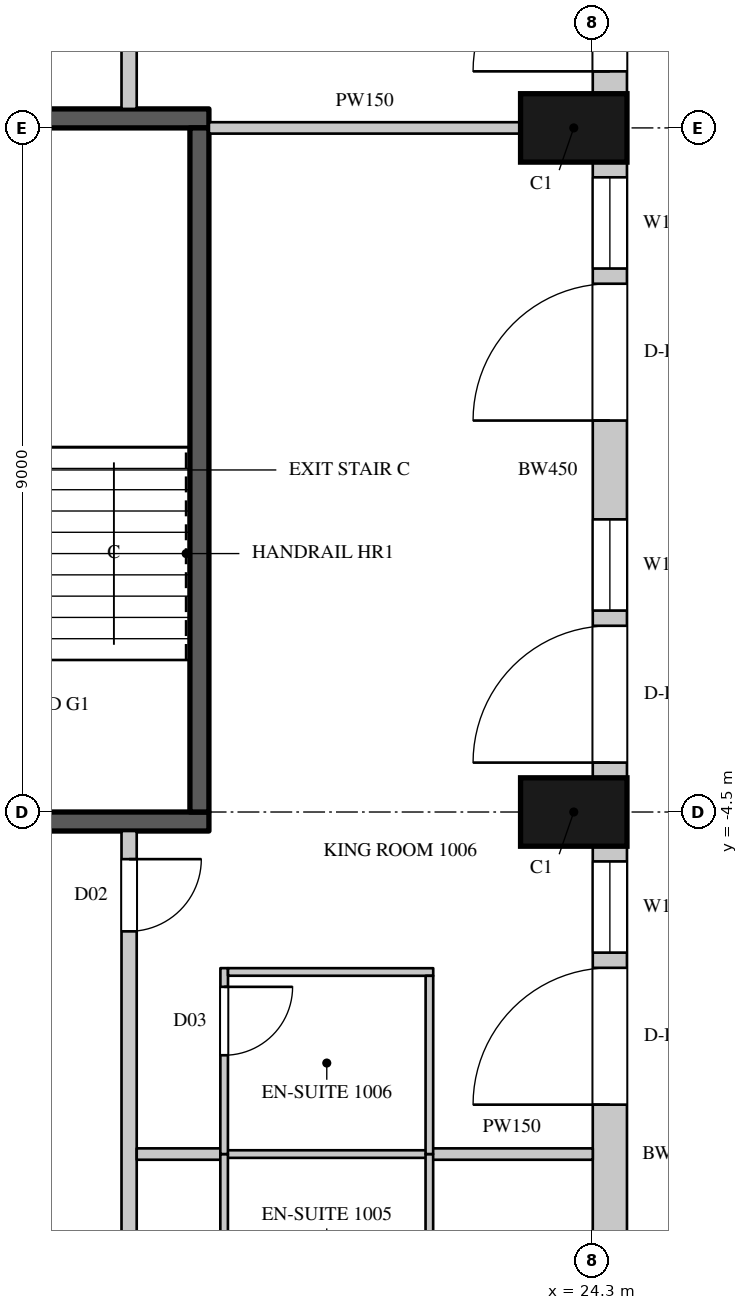
"""IFC4 building model, lengths in metres.
Left out: names, types, materials, properties, quantities, classifications, styles, units other than length and angle.
Written with IfcOpenShell. Run it as: python <this file> out.ifc"""

import sys

from ifc_helpers import new_model, si_unit, direction, frame, frame_2d, origin, origin_2d, place, context, subcontext, project, spatial, rectangle, extrude, element, fill, save


model = new_model("IFC4")
c1 = context("Model", 3, precision=1e-05, world=origin(), true_north=direction((0.0, 1.0)))
c2 = subcontext(c1, "Body", "Model", "MODEL_VIEW")
j1 = project(units=[si_unit("LENGTHUNIT", "METRE"), si_unit("PLANEANGLEUNIT", "RADIAN")], contexts=[c1])
p1 = place(None, origin())
s1 = spatial("IfcSite", under=j1, at=p1, CompositionType="ELEMENT")
p2 = place(p1, origin())
s2 = spatial("IfcBuilding", under=s1, at=p2, CompositionType="ELEMENT")
p3 = place(p2, frame((0.0, 0.0, 66.3)))
s3 = spatial("IfcBuildingStorey", under=s2, at=p3, CompositionType="ELEMENT", Elevation=66.3)
for number, where, z_axis, x_axis in (
    (1, (24.05, -4.5, 0.0), (0.0, 0.0, 1.0), (0.0, 1.0, 0.0)),
    (2, (24.05, 4.5, 0.0), (0.0, 0.0, 1.0), (0.0, 1.0, 0.0)),
):
    element("IfcColumn", number, at=place(p3, frame(where, z_axis=z_axis, x_axis=x_axis)), inside=s3, PredefinedType="COLUMN", context=c2, shape_type="SweptSolid", body=[
        extrude(rectangle(XDim=0.9, YDim=1.4, at=origin_2d()), origin(), (0.0, 0.0, 1.0), 3.6),
    ])
p4 = place(p3, frame((24.525, -13.05, 0.0), z_axis=(0.0, 0.0, 1.0), x_axis=(0.0, 1.0, 0.0)))
e3 = element("IfcWall", 3, at=p4, inside=s3, PredefinedType="SOLIDWALL", context=c2, shape_type="SweptSolid", body=[
    extrude(rectangle(XDim=8.1, YDim=0.45, at=frame_2d((4.05, 0.0))), origin(), (0.0, 0.0, 1.0), 3.3),
])
p5 = place(p4, frame((0.9, 0.0, 0.0)))
e4 = element("IfcOpeningElement", 4, at=p5, cuts=e3, PredefinedType="OPENING", context=c2, shape_type="SweptSolid", body=[
    extrude(rectangle(XDim=1.8, YDim=2.4, at=frame_2d((0.9, 1.2))), frame((0.0, 0.235, 0.0), z_axis=(0.0, -1.0, 0.0), x_axis=(1.0, 0.0, 0.0)), (0.0, 0.0, 1.0), 0.47),
])
p6 = place(p4, frame((4.7, 0.0, 0.0)))
e5 = element("IfcOpeningElement", 5, at=p6, cuts=e3, PredefinedType="OPENING", context=c2, shape_type="SweptSolid", body=[
    extrude(rectangle(XDim=1.8, YDim=2.4, at=frame_2d((0.9, 1.2))), frame((0.0, 0.235, 0.0), z_axis=(0.0, -1.0, 0.0), x_axis=(1.0, 0.0, 0.0)), (0.0, 0.0, 1.0), 0.47),
])
p7 = place(p4, frame((6.7, 0.0, 1.05)))
e6 = element("IfcOpeningElement", 6, at=p7, cuts=e3, PredefinedType="OPENING", context=c2, shape_type="SweptSolid", body=[
    extrude(rectangle(XDim=1.2, YDim=2.0, at=frame_2d((0.6, 1.0))), frame((0.0, 0.235, 0.0), z_axis=(0.0, -1.0, 0.0), x_axis=(1.0, 0.0, 0.0)), (0.0, 0.0, 1.0), 0.47),
])
p8 = place(p3, frame((24.525, -4.05, 0.0), z_axis=(0.0, 0.0, 1.0), x_axis=(0.0, 1.0, 0.0)))
e7 = element("IfcWall", 7, at=p8, inside=s3, PredefinedType="SOLIDWALL", context=c2, shape_type="SweptSolid", body=[
    extrude(rectangle(XDim=8.1, YDim=0.45, at=frame_2d((4.05, 0.0))), origin(), (0.0, 0.0, 1.0), 3.3),
])
p9 = place(p8, frame((0.2, 0.0, 0.0)))
e8 = element("IfcOpeningElement", 8, at=p9, cuts=e7, PredefinedType="OPENING", context=c2, shape_type="SweptSolid", body=[
    extrude(rectangle(XDim=1.8, YDim=2.4, at=frame_2d((0.9, 1.2))), frame((0.0, 0.235, 0.0), z_axis=(0.0, -1.0, 0.0), x_axis=(1.0, 0.0, 0.0)), (0.0, 0.0, 1.0), 0.47),
])
p10 = place(p8, frame((2.2, 0.0, 1.05)))
e9 = element("IfcOpeningElement", 9, at=p10, cuts=e7, PredefinedType="OPENING", context=c2, shape_type="SweptSolid", body=[
    extrude(rectangle(XDim=1.2, YDim=2.0, at=frame_2d((0.6, 1.0))), frame((0.0, 0.235, 0.0), z_axis=(0.0, -1.0, 0.0), x_axis=(1.0, 0.0, 0.0)), (0.0, 0.0, 1.0), 0.47),
])
p11 = place(p8, frame((4.7, 0.0, 0.0)))
e10 = element("IfcOpeningElement", 10, at=p11, cuts=e7, PredefinedType="OPENING", context=c2, shape_type="SweptSolid", body=[
    extrude(rectangle(XDim=1.8, YDim=2.4, at=frame_2d((0.9, 1.2))), frame((0.0, 0.235, 0.0), z_axis=(0.0, -1.0, 0.0), x_axis=(1.0, 0.0, 0.0)), (0.0, 0.0, 1.0), 0.47),
])
p12 = place(p8, frame((6.7, 0.0, 1.05)))
e11 = element("IfcOpeningElement", 11, at=p12, cuts=e7, PredefinedType="OPENING", context=c2, shape_type="SweptSolid", body=[
    extrude(rectangle(XDim=1.2, YDim=2.0, at=frame_2d((0.6, 1.0))), frame((0.0, 0.235, 0.0), z_axis=(0.0, -1.0, 0.0), x_axis=(1.0, 0.0, 0.0)), (0.0, 0.0, 1.0), 0.47),
])
p13 = place(p3, frame((24.525, 4.95, 0.0), z_axis=(0.0, 0.0, 1.0), x_axis=(0.0, 1.0, 0.0)))
e12 = element("IfcWall", 12, at=p13, inside=s3, PredefinedType="SOLIDWALL", context=c2, shape_type="SweptSolid", body=[
    extrude(rectangle(XDim=8.439, YDim=0.45, at=frame_2d((4.219, 0.0))), origin(), (0.0, 0.0, 1.0), 3.3),
])
p14 = place(p13, frame((0.294, 0.0, 0.0)))
e13 = element("IfcOpeningElement", 13, at=p14, cuts=e12, PredefinedType="OPENING", context=c2, shape_type="SweptSolid", body=[
    extrude(rectangle(XDim=1.8, YDim=2.4, at=frame_2d((0.9, 1.2))), frame((0.0, 0.235, 0.0), z_axis=(0.0, -1.0, 0.0), x_axis=(1.0, 0.0, 0.0)), (0.0, 0.0, 1.0), 0.47),
])
p15 = place(p13, frame((2.294, 0.0, 1.05)))
e14 = element("IfcOpeningElement", 14, at=p15, cuts=e12, PredefinedType="OPENING", context=c2, shape_type="SweptSolid", body=[
    extrude(rectangle(XDim=1.2, YDim=2.0, at=frame_2d((0.6, 1.0))), frame((0.0, 0.235, 0.0), z_axis=(0.0, -1.0, 0.0), x_axis=(1.0, 0.0, 0.0)), (0.0, 0.0, 1.0), 0.47),
])
p16 = place(p13, frame((5.232, 0.0, 1.05)))
e15 = element("IfcOpeningElement", 15, at=p16, cuts=e12, PredefinedType="OPENING", context=c2, shape_type="SweptSolid", body=[
    extrude(rectangle(XDim=2.7, YDim=2.0, at=frame_2d((1.35, 1.0))), frame((0.0, 0.235, 0.0), z_axis=(0.0, -1.0, 0.0), x_axis=(1.0, 0.0, 0.0)), (0.0, 0.0, 1.0), 0.47),
])
p17 = place(p3, frame((18.2, -19.42, 0.0), z_axis=(0.0, 0.0, 1.0), x_axis=(0.0, 1.0, 0.0)))
e16 = element("IfcWall", 16, at=p17, inside=s3, PredefinedType="PARTITIONING", context=c2, shape_type="SweptSolid", body=[
    extrude(rectangle(XDim=14.67, YDim=0.2, at=frame_2d((7.335, 0.0))), origin(), (0.0, 0.0, 1.0), 3.3),
])
p18 = place(p17, frame((3.95, 0.0, 0.0)))
e17 = element("IfcOpeningElement", 17, at=p18, cuts=e16, PredefinedType="OPENING", context=c2, shape_type="SweptSolid", body=[
    extrude(rectangle(XDim=0.95, YDim=2.2, at=frame_2d((0.475, 1.1))), frame((0.0, 0.11, 0.0), z_axis=(0.0, -1.0, 0.0), x_axis=(1.0, 0.0, 0.0)), (0.0, 0.0, 1.0), 0.22),
])
p19 = place(p17, frame((13.35, 0.0, 0.0)))
e18 = element("IfcOpeningElement", 18, at=p19, cuts=e16, PredefinedType="OPENING", context=c2, shape_type="SweptSolid", body=[
    extrude(rectangle(XDim=0.95, YDim=2.2, at=frame_2d((0.475, 1.1))), frame((0.0, 0.11, 0.0), z_axis=(0.0, -1.0, 0.0), x_axis=(1.0, 0.0, 0.0)), (0.0, 0.0, 1.0), 0.22),
])
p20 = place(p3, frame((18.2, 4.75, 0.0), z_axis=(0.0, 0.0, 1.0), x_axis=(0.0, 1.0, 0.0)))
e19 = element("IfcWall", 19, at=p20, inside=s3, PredefinedType="PARTITIONING", context=c2, shape_type="SweptSolid", body=[
    extrude(rectangle(XDim=14.134, YDim=0.2, at=frame_2d((7.067, 0.0))), origin(), (0.0, 0.0, 1.0), 3.3),
])
p21 = place(p20, frame((1.7, 0.0, 0.0)))
e20 = element("IfcOpeningElement", 20, at=p21, cuts=e19, PredefinedType="OPENING", context=c2, shape_type="SweptSolid", body=[
    extrude(rectangle(XDim=0.9, YDim=2.2, at=frame_2d((0.45, 1.1))), frame((0.0, 0.11, 0.0), z_axis=(0.0, -1.0, 0.0), x_axis=(1.0, 0.0, 0.0)), (0.0, 0.0, 1.0), 0.22),
])
p22 = place(p3, frame((18.3, -9.0, 0.0), z_axis=(0.0, 0.0, 1.0), x_axis=(1.0, 0.0, 0.0)))
e21 = element("IfcWall", 21, at=p22, inside=s3, PredefinedType="PARTITIONING", context=c2, shape_type="SweptSolid", body=[
    extrude(rectangle(XDim=1.13, YDim=0.15, at=frame_2d((0.565, 0.0))), origin(), (0.0, 0.0, 1.0), 2.65),
])
p23 = place(p3, frame((19.25, 4.5, 0.0), z_axis=(0.0, 0.0, 1.0), x_axis=(1.0, 0.0, 0.0)))
e22 = element("IfcWall", 22, at=p23, inside=s3, PredefinedType="PARTITIONING", context=c2, shape_type="SweptSolid", body=[
    extrude(rectangle(XDim=4.1, YDim=0.15, at=frame_2d((2.05, 0.0))), origin(), (0.0, 0.0, 1.0), 3.3),
])
p24 = place(p3, frame((22.17, -9.0, 0.0), z_axis=(0.0, 0.0, 1.0), x_axis=(1.0, 0.0, 0.0)))
e23 = element("IfcWall", 23, at=p24, inside=s3, PredefinedType="PARTITIONING", context=c2, shape_type="SweptSolid", body=[
    extrude(rectangle(XDim=2.13, YDim=0.15, at=frame_2d((1.065, 0.0))), origin(), (0.0, 0.0, 1.0), 2.65),
])
for number, where, z_axis, x_axis in (
    (24, (14.55, -4.625, 0.0), (0.0, 0.0, 1.0), (1.0, 0.0, 0.0)),
    (25, (14.55, 4.625, 0.0), (0.0, 0.0, 1.0), (1.0, 0.0, 0.0)),
):
    element("IfcWall", number, at=place(p3, frame(where, z_axis=z_axis, x_axis=x_axis)), inside=s3, PredefinedType="SHEAR", context=c2, shape_type="SweptSolid", body=[
        extrude(rectangle(XDim=4.7, YDim=0.25, at=frame_2d((2.35, 0.0))), origin(), (0.0, 0.0, 1.0), 3.3),
    ])
p25 = place(p3, frame((19.125, -4.5, 0.0), z_axis=(0.0, 0.0, 1.0), x_axis=(0.0, 1.0, 0.0)))
e26 = element("IfcWall", 26, at=p25, inside=s3, PredefinedType="SHEAR", context=c2, shape_type="SweptSolid", body=[
    extrude(rectangle(XDim=9.0, YDim=0.25, at=frame_2d((4.5, 0.0))), origin(), (0.0, 0.0, 1.0), 3.3),
])
p26 = place(p3, frame((19.43, -9.0, 0.0), z_axis=(0.0, 0.0, 1.0), x_axis=(1.0, 0.0, 0.0)))
e27 = element("IfcWall", 27, at=p26, inside=s3, PredefinedType="PARTITIONING", context=c2, shape_type="SweptSolid", body=[
    extrude(rectangle(XDim=2.74, YDim=0.1, at=frame_2d((1.37, 0.0))), origin(), (0.0, 0.0, 1.0), 2.65),
])
p27 = place(p3, frame((19.45, -11.346, 0.0), z_axis=(0.0, 0.0, 1.0), x_axis=(0.0, 1.0, 0.0)))
e28 = element("IfcWall", 28, at=p27, inside=s3, PredefinedType="PARTITIONING", context=c2, shape_type="SweptSolid", body=[
    extrude(rectangle(XDim=2.346, YDim=0.1, at=frame_2d((1.173, 0.0))), origin(), (0.0, 0.0, 1.0), 3.3),
])
p28 = place(p27, frame((0.15, 0.0, 0.0)))
e29 = element("IfcOpeningElement", 29, at=p28, cuts=e28, PredefinedType="OPENING", context=c2, shape_type="SweptSolid", body=[
    extrude(rectangle(XDim=0.9, YDim=2.2, at=frame_2d((0.45, 1.1))), frame((0.0, 0.06, 0.0), z_axis=(0.0, -1.0, 0.0), x_axis=(1.0, 0.0, 0.0)), (0.0, 0.0, 1.0), 0.12),
])
p29 = place(p3, frame((19.45, -9.0, 0.0), z_axis=(0.0, 0.0, 1.0), x_axis=(0.000399241409, 0.999999920303, 0.0)))
e30 = element("IfcWall", 30, at=p29, inside=s3, PredefinedType="PARTITIONING", context=c2, shape_type="SweptSolid", body=[
    extrude(rectangle(XDim=2.446, YDim=0.1, at=frame_2d((1.223, 0.0))), origin(), (0.0, 0.0, 1.0), 3.3),
])
p30 = place(p29, frame((1.3, 0.0, 0.0)))
e31 = element("IfcOpeningElement", 31, at=p30, cuts=e30, PredefinedType="OPENING", context=c2, shape_type="SweptSolid", body=[
    extrude(rectangle(XDim=0.9, YDim=2.2, at=frame_2d((0.45, 1.1))), frame((0.0, 0.06, 0.0), z_axis=(0.0, -1.0, 0.0), x_axis=(1.0, 0.0, 0.0)), (0.0, 0.0, 1.0), 0.12),
])
p31 = place(p3, frame((19.501, -6.604, 0.0), z_axis=(0.0, 0.0, 1.0), x_axis=(0.999999934588, -0.000361696332, 0.0)))
e32 = element("IfcWall", 32, at=p31, inside=s3, PredefinedType="PARTITIONING", context=c2, shape_type="SweptSolid", body=[
    extrude(rectangle(XDim=2.7, YDim=0.1, at=frame_2d((1.35, 0.0))), origin(), (0.0, 0.0, 1.0), 3.3),
])
p32 = place(p3, frame((22.15, -11.346, 0.0), z_axis=(0.0, 0.0, 1.0), x_axis=(0.0, 1.0, 0.0)))
e33 = element("IfcWall", 33, at=p32, inside=s3, PredefinedType="PARTITIONING", context=c2, shape_type="SweptSolid", body=[
    extrude(rectangle(XDim=2.346, YDim=0.1, at=frame_2d((1.173, 0.0))), origin(), (0.0, 0.0, 1.0), 3.3),
])
p33 = place(p3, frame((22.15, -9.0, 0.0), z_axis=(0.0, 0.0, 1.0), x_axis=(0.00041644973, 0.999999913285, 0.0)))
e34 = element("IfcWall", 34, at=p33, inside=s3, PredefinedType="PARTITIONING", context=c2, shape_type="SweptSolid", body=[
    extrude(rectangle(XDim=2.345, YDim=0.1, at=frame_2d((1.172, 0.0))), origin(), (0.0, 0.0, 1.0), 3.3),
])
p34 = place(p6, origin())
e35 = element("IfcDoor", 35, at=p34, inside=s3, OperationType="SLIDING_TO_LEFT", PredefinedType="DOOR", context=c2, shape_type="SweptSolid", body=[
    extrude(rectangle(XDim=1.8, YDim=2.4, at=frame_2d((0.9, 1.2))), frame((0.0, 0.13, 0.0), z_axis=(0.0, -1.0, 0.0), x_axis=(1.0, 0.0, 0.0)), (0.0, 0.0, 1.0), 0.05),
])
fill(e5, e35)
p35 = place(p7, origin())
e36 = element("IfcWindow", 36, at=p35, inside=s3, PartitioningType="SINGLE_PANEL", PredefinedType="WINDOW", context=c2, shape_type="SweptSolid", body=[
    extrude(rectangle(XDim=1.2, YDim=2.0, at=frame_2d((0.6, 1.0))), frame((0.0, 0.135, 0.0), z_axis=(0.0, -1.0, 0.0), x_axis=(1.0, 0.0, 0.0)), (0.0, 0.0, 1.0), 0.06),
])
fill(e6, e36)
p36 = place(p9, origin())
e37 = element("IfcDoor", 37, at=p36, inside=s3, OperationType="SLIDING_TO_LEFT", PredefinedType="DOOR", context=c2, shape_type="SweptSolid", body=[
    extrude(rectangle(XDim=1.8, YDim=2.4, at=frame_2d((0.9, 1.2))), frame((0.0, 0.13, 0.0), z_axis=(0.0, -1.0, 0.0), x_axis=(1.0, 0.0, 0.0)), (0.0, 0.0, 1.0), 0.05),
])
fill(e8, e37)
p37 = place(p10, origin())
e38 = element("IfcWindow", 38, at=p37, inside=s3, PartitioningType="SINGLE_PANEL", PredefinedType="WINDOW", context=c2, shape_type="SweptSolid", body=[
    extrude(rectangle(XDim=1.2, YDim=2.0, at=frame_2d((0.6, 1.0))), frame((0.0, 0.135, 0.0), z_axis=(0.0, -1.0, 0.0), x_axis=(1.0, 0.0, 0.0)), (0.0, 0.0, 1.0), 0.06),
])
fill(e9, e38)
p38 = place(p11, origin())
e39 = element("IfcDoor", 39, at=p38, inside=s3, OperationType="SLIDING_TO_LEFT", PredefinedType="DOOR", context=c2, shape_type="SweptSolid", body=[
    extrude(rectangle(XDim=1.8, YDim=2.4, at=frame_2d((0.9, 1.2))), frame((0.0, 0.13, 0.0), z_axis=(0.0, -1.0, 0.0), x_axis=(1.0, 0.0, 0.0)), (0.0, 0.0, 1.0), 0.05),
])
fill(e10, e39)
p39 = place(p12, origin())
e40 = element("IfcWindow", 40, at=p39, inside=s3, PartitioningType="SINGLE_PANEL", PredefinedType="WINDOW", context=c2, shape_type="SweptSolid", body=[
    extrude(rectangle(XDim=1.2, YDim=2.0, at=frame_2d((0.6, 1.0))), frame((0.0, 0.135, 0.0), z_axis=(0.0, -1.0, 0.0), x_axis=(1.0, 0.0, 0.0)), (0.0, 0.0, 1.0), 0.06),
])
fill(e11, e40)
p40 = place(p14, origin())
e41 = element("IfcDoor", 41, at=p40, inside=s3, OperationType="SLIDING_TO_LEFT", PredefinedType="DOOR", context=c2, shape_type="SweptSolid", body=[
    extrude(rectangle(XDim=1.8, YDim=2.4, at=frame_2d((0.9, 1.2))), frame((0.0, 0.13, 0.0), z_axis=(0.0, -1.0, 0.0), x_axis=(1.0, 0.0, 0.0)), (0.0, 0.0, 1.0), 0.05),
])
fill(e13, e41)
p41 = place(p19, origin())
e42 = element("IfcDoor", 42, at=p41, inside=s3, OperationType="SINGLE_SWING_LEFT", PredefinedType="DOOR", context=c2, shape_type="SweptSolid", body=[
    extrude(rectangle(XDim=0.95, YDim=2.2, at=frame_2d((0.475, 1.1))), frame((0.0, 0.025, 0.0), z_axis=(0.0, -1.0, 0.0), x_axis=(1.0, 0.0, 0.0)), (0.0, 0.0, 1.0), 0.05),
])
fill(e18, e42)
p42 = place(p30, origin())
e43 = element("IfcDoor", 43, at=p42, inside=s3, OperationType="SINGLE_SWING_LEFT", PredefinedType="DOOR", context=c2, shape_type="SweptSolid", body=[
    extrude(rectangle(XDim=0.9, YDim=2.2, at=frame_2d((0.45, 1.1))), frame((0.0, 0.025, 0.0), z_axis=(0.0, -1.0, 0.0), x_axis=(1.0, 0.0, 0.0)), (0.0, 0.0, 1.0), 0.05),
])
fill(e31, e43)
save(model, sys.argv[1])
